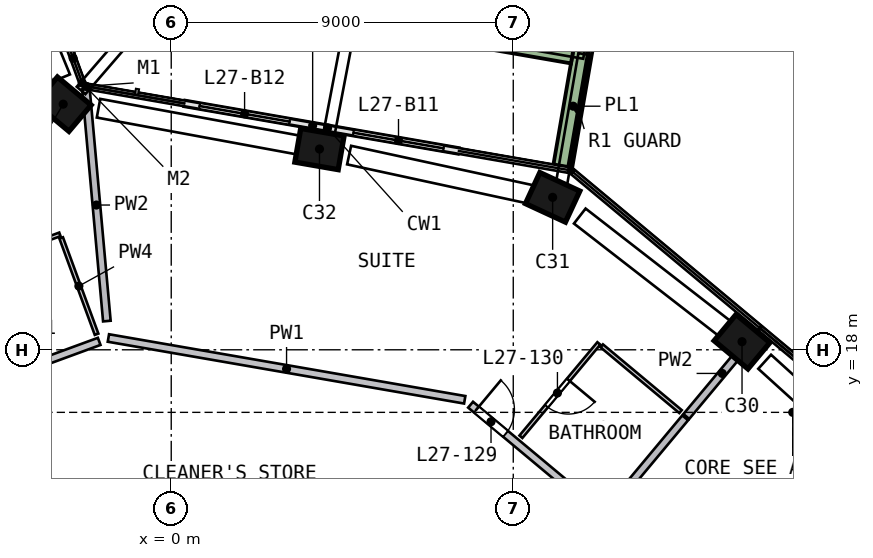
"""IFC4 building model, lengths in metres.
Left out: names, types, materials, properties, quantities, classifications, styles, units other than length and angle.
Written with IfcOpenShell. Run it as: python <this file> out.ifc"""

import sys

from ifc_helpers import new_model, si_unit, direction, frame, frame_2d, origin, origin_2d, place, context, subcontext, project, spatial, rectangle, extrude, element, fill, save


model = new_model("IFC4")
c1 = context("Model", 3, precision=1e-05, world=origin(), true_north=direction((0.0, 1.0)))
c2 = subcontext(c1, "Body", "Model", "MODEL_VIEW")
j1 = project(units=[si_unit("LENGTHUNIT", "METRE"), si_unit("PLANEANGLEUNIT", "RADIAN")], contexts=[c1])
p1 = place(None, origin())
s1 = spatial("IfcSite", under=j1, at=p1, CompositionType="ELEMENT")
p2 = place(p1, origin())
s2 = spatial("IfcBuilding", under=s1, at=p2, CompositionType="ELEMENT")
p3 = place(p2, frame((0.0, 0.0, 115.0)))
s3 = spatial("IfcBuildingStorey", under=s2, at=p3, CompositionType="ELEMENT", Elevation=115.0)
p4 = place(p3, frame((15.125, 18.127, 0.0), z_axis=(-0.086849132, 0.071258876, 0.993669664), x_axis=(-0.7628125, 0.636786768, -0.112337447)))
e1 = element("IfcColumn", 1, at=p4, inside=s3, PredefinedType="COLUMN", context=c2, shape_type="SweptSolid", body=[
    extrude(rectangle(XDim=1.15, YDim=0.9, at=origin_2d()), origin(), (0.0, 0.0, 1.0), 3.21),
])
p5 = place(p3, frame((10.163, 21.955, 0.0), z_axis=(-0.104839983, 0.047440282, 0.993356934), x_axis=(0.90150539, -0.417189371, 0.115069807)))
e2 = element("IfcColumn", 2, at=p5, inside=s3, PredefinedType="COLUMN", context=c2, shape_type="SweptSolid", body=[
    extrude(rectangle(XDim=1.15, YDim=0.9, at=origin_2d()), origin(), (0.0, 0.0, 1.0), 3.211),
])
p6 = place(p3, frame((4.035, 23.261, 0.0), z_axis=(-0.11080543, 0.018252096, 0.993674503), x_axis=(-0.979056669, 0.169817412, -0.112294638)))
e3 = element("IfcColumn", 3, at=p6, inside=s3, PredefinedType="COLUMN", context=c2, shape_type="SweptSolid", body=[
    extrude(rectangle(XDim=1.15, YDim=0.9, at=origin_2d()), origin(), (0.0, 0.0, 1.0), 3.21),
])
p7 = place(p3, frame((-2.702, 24.48, 0.0), z_axis=(-0.116292029, -0.013833431, 0.993118724), x_axis=(0.760993508, -0.643790306, 0.080143137)))
e4 = element("IfcColumn", 4, at=p7, inside=s3, PredefinedType="COLUMN", context=c2, shape_type="SweptSolid", body=[
    extrude(rectangle(XDim=1.15, YDim=0.9, at=origin_2d()), origin(), (0.0, 0.0, 1.0), 3.212),
])
p8 = place(p3, frame((7.557, 23.234, 0.0), z_axis=(0.0, 0.0, 1.0), x_axis=(-0.985282315, 0.170934959, 0.0)))
e5 = element("IfcWall", 5, at=p8, inside=s3, PredefinedType="SOLIDWALL", context=c2, shape_type="SweptSolid", body=[
    extrude(rectangle(XDim=3.475, YDim=0.15, at=frame_2d((1.737, 0.0))), origin(), (0.0, 0.0, 1.0), 2.425),
])
p9 = place(p8, frame((0.4, 0.0, 0.0)))
e6 = element("IfcOpeningElement", 6, at=p9, cuts=e5, PredefinedType="OPENING", context=c2, shape_type="SweptSolid", body=[
    extrude(rectangle(XDim=2.4, YDim=2.4, at=frame_2d((1.2, 1.2))), frame((0.0, 0.085, 0.0), z_axis=(0.0, -1.0, 0.0), x_axis=(1.0, 0.0, 0.0)), (0.0, 0.0, 1.0), 0.17),
])
p10 = place(p3, frame((4.133, 23.828, 0.0), z_axis=(0.0, 0.0, 1.0), x_axis=(-0.985286876, 0.170908667, 0.0)))
e7 = element("IfcWall", 7, at=p10, inside=s3, PredefinedType="SOLIDWALL", context=c2, shape_type="SweptSolid", body=[
    extrude(rectangle(XDim=3.835, YDim=0.15, at=frame_2d((1.918, 0.0))), origin(), (0.0, 0.0, 1.0), 2.425),
])
p11 = place(p10, frame((1.035, 0.0, 0.0)))
e8 = element("IfcOpeningElement", 8, at=p11, cuts=e7, PredefinedType="OPENING", context=c2, shape_type="SweptSolid", body=[
    extrude(rectangle(XDim=2.4, YDim=2.4, at=frame_2d((1.2, 1.2))), frame((0.0, 0.085, 0.0), z_axis=(0.0, -1.0, 0.0), x_axis=(1.0, 0.0, 0.0)), (0.0, 0.0, 1.0), 0.17),
])
p12 = place(p3, frame((10.304, 22.834, 0.0), z_axis=(0.0, 0.0, 1.0), x_axis=(0.170867726, 0.985293977, 0.0)))
e9 = element("IfcWall", 9, at=p12, inside=s3, PredefinedType="SOLIDWALL", context=c2, shape_type="SweptSolid", body=[
    extrude(rectangle(XDim=3.199, YDim=0.5, at=frame_2d((1.6, 0.0))), origin(), (0.0, 0.0, 1.0), 0.7),
])
p13 = place(p3, frame((10.562, 25.783, 0.0), z_axis=(0.0, 0.0, 1.0), x_axis=(-0.985287187, 0.170906875, 0.0)))
e10 = element("IfcWall", 10, at=p13, inside=s3, PredefinedType="SOLIDWALL", context=c2, shape_type="SweptSolid", body=[
    extrude(rectangle(XDim=10.652, YDim=0.5, at=frame_2d((5.326, 0.0))), origin(), (0.0, 0.0, 1.0), 0.7),
])
p14 = place(p3, frame((-1.896, 18.221, 0.0), z_axis=(0.0, 0.0, 1.0), x_axis=(-0.938747051, -0.344606984, 0.0)))
e11 = element("IfcWall", 11, at=p14, inside=s3, PredefinedType="SOLIDWALL", context=c2, shape_type="SweptSolid", body=[
    extrude(rectangle(XDim=3.4, YDim=0.2, at=frame_2d((1.7, 0.0))), origin(), (0.0, 0.0, 1.0), 3.19),
])
p15 = place(p3, frame((7.723, 16.684, 0.0), z_axis=(0.0, 0.0, 1.0), x_axis=(-0.985289421, 0.170893991, 0.0)))
e12 = element("IfcWall", 12, at=p15, inside=s3, PredefinedType="SOLIDWALL", context=c2, shape_type="SweptSolid", body=[
    extrude(rectangle(XDim=9.516, YDim=0.2, at=frame_2d((4.758, 0.0))), origin(), (0.0, 0.0, 1.0), 3.19),
])
p16 = place(p3, frame((7.877, 16.555, 0.0), z_axis=(0.0, 0.0, 1.0), x_axis=(0.767836961, -0.6406453, 0.0)))
e13 = element("IfcWall", 13, at=p16, inside=s3, PredefinedType="SOLIDWALL", context=c2, shape_type="SweptSolid", body=[
    extrude(rectangle(XDim=9.115, YDim=0.2, at=frame_2d((4.558, 0.0))), origin(), (0.0, 0.0, 1.0), 3.19),
])
p17 = place(p16, frame((0.2, 0.0, 0.0)))
e14 = element("IfcOpeningElement", 14, at=p17, cuts=e13, PredefinedType="OPENING", context=c2, shape_type="SweptSolid", body=[
    extrude(rectangle(XDim=1.0, YDim=2.1, at=frame_2d((0.5, 1.05))), frame((0.0, 0.11, 0.0), z_axis=(0.0, -1.0, 0.0), x_axis=(1.0, 0.0, 0.0)), (0.0, 0.0, 1.0), 0.22),
])
p18 = place(p3, frame((-2.245, 24.863, 0.0), z_axis=(0.0, 0.0, 1.0), x_axis=(0.089939825, -0.995947201, 0.0)))
e15 = element("IfcWall", 15, at=p18, inside=s3, PredefinedType="SOLIDWALL", context=c2, shape_type="SweptSolid", body=[
    extrude(rectangle(XDim=6.132, YDim=0.2, at=frame_2d((3.066, 0.0))), origin(), (0.0, 0.0, 1.0), 3.19),
])
p19 = place(p3, frame((11.663, 13.979, 0.0), z_axis=(0.0, 0.0, 1.0), x_axis=(0.64065553, 0.767828426, 0.0)))
e16 = element("IfcWall", 16, at=p19, inside=s3, PredefinedType="SOLIDWALL", context=c2, shape_type="SweptSolid", body=[
    extrude(rectangle(XDim=2.905, YDim=0.2, at=frame_2d((1.452, 0.0))), origin(), (0.0, 0.0, 1.0), 3.19),
])
p20 = place(p3, frame((13.554, 16.245, 0.0), z_axis=(0.0, 0.0, 1.0), x_axis=(0.640639847, 0.767841511, 0.0)))
e17 = element("IfcWall", 17, at=p20, inside=s3, PredefinedType="SOLIDWALL", context=c2, shape_type="SweptSolid", body=[
    extrude(rectangle(XDim=2.952, YDim=0.2, at=frame_2d((1.476, 0.0))), origin(), (0.0, 0.0, 1.0), 3.19),
])
p21 = place(p3, frame((-2.93, 21.037, 0.0), z_axis=(0.0, 0.0, 1.0), x_axis=(-0.938739792, -0.344626759, 0.0)))
e18 = element("IfcWall", 18, at=p21, inside=s3, PredefinedType="PARTITIONING", context=c2, shape_type="SweptSolid", body=[
    extrude(rectangle(XDim=3.2, YDim=0.1, at=frame_2d((1.6, 0.0))), origin(), (0.0, 0.0, 1.0), 3.19),
])
p22 = place(p21, frame((1.25, 0.0, 0.0)))
e19 = element("IfcOpeningElement", 19, at=p22, cuts=e18, PredefinedType="OPENING", context=c2, shape_type="SweptSolid", body=[
    extrude(rectangle(XDim=0.9, YDim=2.1, at=frame_2d((0.45, 1.05))), frame((0.0, 0.06, 0.0), z_axis=(0.0, -1.0, 0.0), x_axis=(1.0, 0.0, 0.0)), (0.0, 0.0, 1.0), 0.12),
])
p23 = place(p3, frame((-1.965, 18.409, 0.0), z_axis=(0.0, 0.0, 1.0), x_axis=(-0.344674382, 0.938722307, 0.0)))
e20 = element("IfcWall", 20, at=p23, inside=s3, PredefinedType="PARTITIONING", context=c2, shape_type="SweptSolid", body=[
    extrude(rectangle(XDim=2.7, YDim=0.1, at=frame_2d((1.35, 0.0))), origin(), (0.0, 0.0, 1.0), 3.19),
])
p24 = place(p3, frame((11.251, 18.168, 0.0), z_axis=(0.0, 0.0, 1.0), x_axis=(-0.640612028, -0.767864721, 0.0)))
e21 = element("IfcWall", 21, at=p24, inside=s3, PredefinedType="PARTITIONING", context=c2, shape_type="SweptSolid", body=[
    extrude(rectangle(XDim=3.2, YDim=0.1, at=frame_2d((1.6, 0.0))), origin(), (0.0, 0.0, 1.0), 3.19),
])
p25 = place(p24, frame((1.25, 0.0, 0.0)))
e22 = element("IfcOpeningElement", 22, at=p25, cuts=e21, PredefinedType="OPENING", context=c2, shape_type="SweptSolid", body=[
    extrude(rectangle(XDim=0.9, YDim=2.1, at=frame_2d((0.45, 1.05))), frame((0.0, 0.06, 0.0), z_axis=(0.0, -1.0, 0.0), x_axis=(1.0, 0.0, 0.0)), (0.0, 0.0, 1.0), 0.12),
])
p26 = place(p3, frame((11.328, 18.104, 0.0), z_axis=(0.0, 0.0, 1.0), x_axis=(0.767813462, -0.640673464, 0.0)))
e23 = element("IfcWall", 23, at=p26, inside=s3, PredefinedType="PARTITIONING", context=c2, shape_type="SweptSolid", body=[
    extrude(rectangle(XDim=2.7, YDim=0.1, at=frame_2d((1.35, 0.0))), origin(), (0.0, 0.0, 1.0), 3.19),
])
p27 = place(p9, origin())
e24 = element("IfcDoor", 24, at=p27, inside=s3, OperationType="SLIDING_TO_RIGHT", PredefinedType="DOOR", context=c2, shape_type="SweptSolid", body=[
    extrude(rectangle(XDim=2.4, YDim=2.4, at=frame_2d((1.2, 1.2))), frame((0.0, 0.025, 0.0), z_axis=(0.0, -1.0, 0.0), x_axis=(1.0, 0.0, 0.0)), (0.0, 0.0, 1.0), 0.05),
])
fill(e6, e24)
p28 = place(p11, origin())
e25 = element("IfcDoor", 25, at=p28, inside=s3, OperationType="SLIDING_TO_LEFT", PredefinedType="DOOR", context=c2, shape_type="SweptSolid", body=[
    extrude(rectangle(XDim=2.4, YDim=2.4, at=frame_2d((1.2, 1.2))), frame((0.0, 0.025, 0.0), z_axis=(0.0, -1.0, 0.0), x_axis=(1.0, 0.0, 0.0)), (0.0, 0.0, 1.0), 0.05),
])
fill(e8, e25)
p29 = place(p17, origin())
e26 = element("IfcDoor", 26, at=p29, inside=s3, OperationType="SINGLE_SWING_LEFT", PredefinedType="DOOR", context=c2, shape_type="SweptSolid", body=[
    extrude(rectangle(XDim=1.0, YDim=2.1, at=frame_2d((0.5, 1.05))), frame((0.0, 0.025, 0.0), z_axis=(0.0, -1.0, 0.0), x_axis=(1.0, 0.0, 0.0)), (0.0, 0.0, 1.0), 0.05),
])
fill(e14, e26)
p30 = place(p25, origin())
e27 = element("IfcDoor", 27, at=p30, inside=s3, OperationType="SINGLE_SWING_LEFT", PredefinedType="DOOR", context=c2, shape_type="SweptSolid", body=[
    extrude(rectangle(XDim=0.9, YDim=2.1, at=frame_2d((0.45, 1.05))), frame((0.0, 0.025, 0.0), z_axis=(0.0, -1.0, 0.0), x_axis=(1.0, 0.0, 0.0)), (0.0, 0.0, 1.0), 0.05),
])
fill(e22, e27)
save(model, sys.argv[1])
